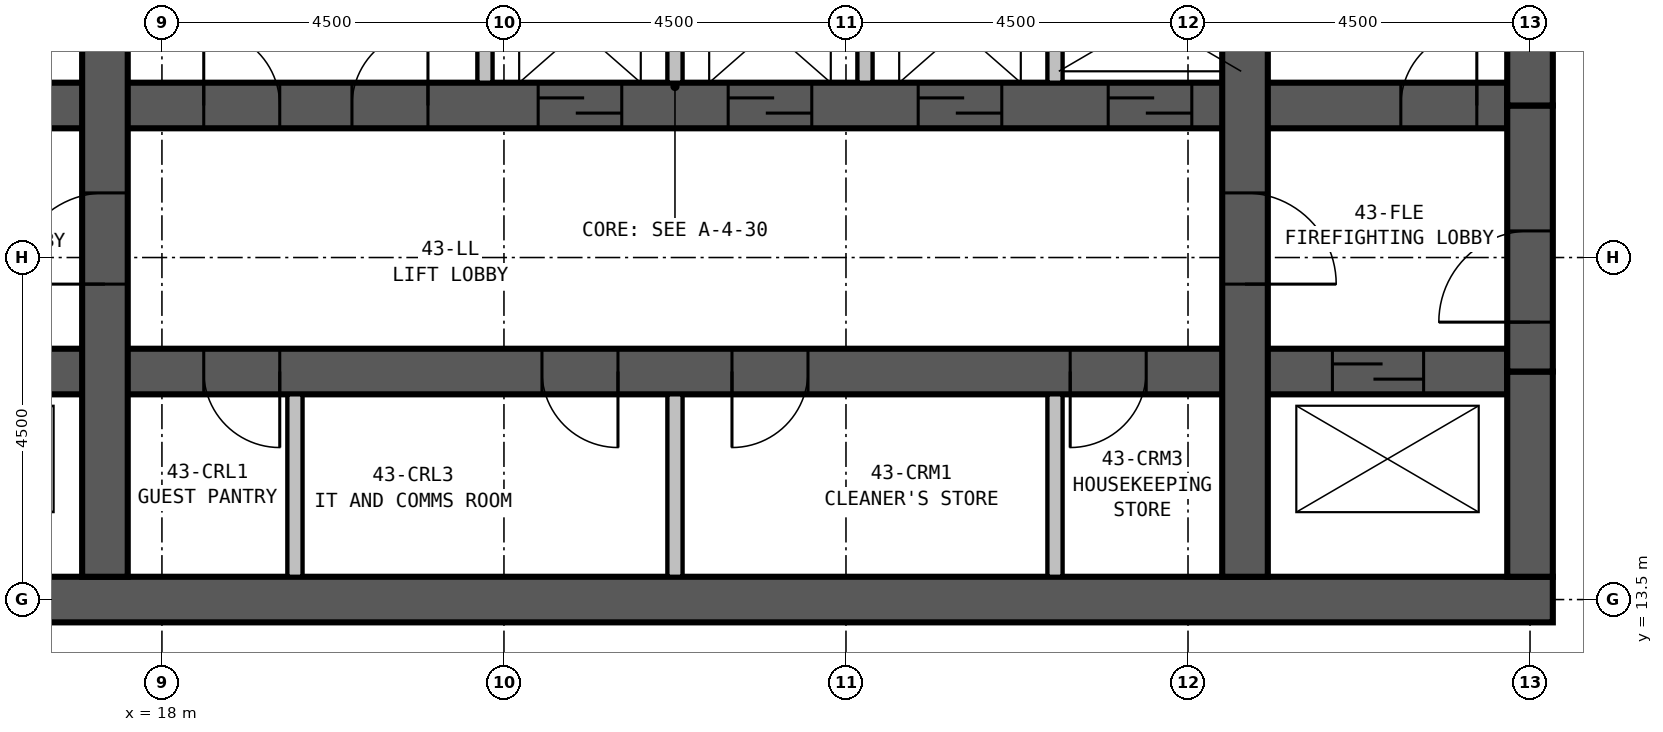
"""IFC4 building model, lengths in metres.
Left out: names, types, materials, properties, quantities, classifications, styles, units other than length and angle.
Written with IfcOpenShell. Run it as: python <this file> out.ifc"""

import sys

from ifc_helpers import new_model, si_unit, direction, frame, frame_2d, origin, place, context, subcontext, project, spatial, rectangle, extrude, element, fill, save


model = new_model("IFC4")
c1 = context("Model", 3, precision=1e-05, world=origin(), true_north=direction((0.0, 1.0)))
c2 = subcontext(c1, "Body", "Model", "MODEL_VIEW")
j1 = project(units=[si_unit("LENGTHUNIT", "METRE"), si_unit("PLANEANGLEUNIT", "RADIAN")], contexts=[c1])
p1 = place(None, origin())
s1 = spatial("IfcSite", under=j1, at=p1, CompositionType="ELEMENT")
p2 = place(p1, origin())
s2 = spatial("IfcBuilding", under=s1, at=p2, CompositionType="ELEMENT")
p3 = place(p2, frame((0.0, 0.0, 169.4)))
s3 = spatial("IfcBuildingStorey", under=s2, at=p3, CompositionType="ELEMENT", Elevation=169.4)
p4 = place(p3, frame((13.2, 13.5, 0.0), z_axis=(0.0, 0.0, 1.0), x_axis=(1.0, 0.0, 0.0)))
e1 = element("IfcWall", 1, at=p4, inside=s3, PredefinedType="SHEAR", context=c2, shape_type="SweptSolid", body=[
    extrude(rectangle(XDim=23.1, YDim=0.6, at=frame_2d((11.55, 0.0))), origin(), (0.0, 0.0, 1.0), 3.5),
])
p5 = place(p3, frame((17.25, 13.8, 0.0), z_axis=(0.0, 0.0, 1.0), x_axis=(0.0, 1.0, 0.0)))
e2 = element("IfcWall", 2, at=p5, inside=s3, PredefinedType="SHEAR", context=c2, shape_type="SweptSolid", body=[
    extrude(rectangle(XDim=12.9, YDim=0.6, at=frame_2d((6.45, 0.0))), origin(), (0.0, 0.0, 1.0), 3.5),
])
p6 = place(p5, frame((3.85, 0.0, 0.0)))
e3 = element("IfcOpeningElement", 3, at=p6, cuts=e2, PredefinedType="OPENING", context=c2, shape_type="SweptSolid", body=[
    extrude(rectangle(XDim=1.2, YDim=2.1, at=frame_2d((0.6, 1.05))), frame((0.0, 0.31, 0.0), z_axis=(0.0, -1.0, 0.0), x_axis=(1.0, 0.0, 0.0)), (0.0, 0.0, 1.0), 0.62),
])
p7 = place(p3, frame((32.25, 13.8, 0.0), z_axis=(0.0, 0.0, 1.0), x_axis=(0.0, 1.0, 0.0)))
e4 = element("IfcWall", 4, at=p7, inside=s3, PredefinedType="SHEAR", context=c2, shape_type="SweptSolid", body=[
    extrude(rectangle(XDim=12.9, YDim=0.6, at=frame_2d((6.45, 0.0))), origin(), (0.0, 0.0, 1.0), 3.5),
])
p8 = place(p7, frame((5.05, 0.0, 0.0), z_axis=(0.0, 0.0, 1.0), x_axis=(-1.0, 0.0, 0.0)))
e5 = element("IfcOpeningElement", 5, at=p8, cuts=e4, PredefinedType="OPENING", context=c2, shape_type="SweptSolid", body=[
    extrude(rectangle(XDim=1.2, YDim=2.1, at=frame_2d((0.6, 1.05))), frame((0.0, 0.31, 0.0), z_axis=(0.0, -1.0, 0.0), x_axis=(1.0, 0.0, 0.0)), (0.0, 0.0, 1.0), 0.62),
])
p9 = place(p3, frame((13.8, 16.5, 0.0), z_axis=(0.0, 0.0, 1.0), x_axis=(1.0, 0.0, 0.0)))
e6 = element("IfcWall", 6, at=p9, inside=s3, PredefinedType="SHEAR", context=c2, shape_type="SweptSolid", body=[
    extrude(rectangle(XDim=21.9, YDim=0.6, at=frame_2d((10.95, 0.0))), origin(), (0.0, 0.0, 1.0), 3.5),
])
p10 = place(p9, frame((5.75, 0.0, 0.0), z_axis=(0.0, 0.0, 1.0), x_axis=(-1.0, 0.0, 0.0)))
e7 = element("IfcOpeningElement", 7, at=p10, cuts=e6, PredefinedType="OPENING", context=c2, shape_type="SweptSolid", body=[
    extrude(rectangle(XDim=1.0, YDim=2.1, at=frame_2d((0.5, 1.05))), frame((0.0, 0.31, 0.0), z_axis=(0.0, -1.0, 0.0), x_axis=(1.0, 0.0, 0.0)), (0.0, 0.0, 1.0), 0.62),
])
p11 = place(p9, frame((10.2, 0.0, 0.0), z_axis=(0.0, 0.0, 1.0), x_axis=(-1.0, 0.0, 0.0)))
e8 = element("IfcOpeningElement", 8, at=p11, cuts=e6, PredefinedType="OPENING", context=c2, shape_type="SweptSolid", body=[
    extrude(rectangle(XDim=1.0, YDim=2.1, at=frame_2d((0.5, 1.05))), frame((0.0, 0.31, 0.0), z_axis=(0.0, -1.0, 0.0), x_axis=(1.0, 0.0, 0.0)), (0.0, 0.0, 1.0), 0.62),
])
p12 = place(p9, frame((12.7, 0.0, 0.0), z_axis=(0.0, 0.0, 1.0), x_axis=(-1.0, 0.0, 0.0)))
e9 = element("IfcOpeningElement", 9, at=p12, cuts=e6, PredefinedType="OPENING", context=c2, shape_type="SweptSolid", body=[
    extrude(rectangle(XDim=1.0, YDim=2.1, at=frame_2d((0.5, 1.05))), frame((0.0, 0.31, 0.0), z_axis=(0.0, -1.0, 0.0), x_axis=(1.0, 0.0, 0.0)), (0.0, 0.0, 1.0), 0.62),
])
p13 = place(p9, frame((17.15, 0.0, 0.0), z_axis=(0.0, 0.0, 1.0), x_axis=(-1.0, 0.0, 0.0)))
e10 = element("IfcOpeningElement", 10, at=p13, cuts=e6, PredefinedType="OPENING", context=c2, shape_type="SweptSolid", body=[
    extrude(rectangle(XDim=1.0, YDim=2.1, at=frame_2d((0.5, 1.05))), frame((0.0, 0.31, 0.0), z_axis=(0.0, -1.0, 0.0), x_axis=(1.0, 0.0, 0.0)), (0.0, 0.0, 1.0), 0.62),
])
p14 = place(p9, frame((0.6, 0.0, 0.0)))
e11 = element("IfcOpeningElement", 11, at=p14, cuts=e6, PredefinedType="OPENING", context=c2, shape_type="SweptSolid", body=[
    extrude(rectangle(XDim=1.2, YDim=2.1, at=frame_2d((0.6, 1.05))), frame((0.0, 0.31, 0.0), z_axis=(0.0, -1.0, 0.0), x_axis=(1.0, 0.0, 0.0)), (0.0, 0.0, 1.0), 0.62),
])
p15 = place(p9, frame((19.6, 0.0, 0.0)))
e12 = element("IfcOpeningElement", 12, at=p15, cuts=e6, PredefinedType="OPENING", context=c2, shape_type="SweptSolid", body=[
    extrude(rectangle(XDim=1.2, YDim=2.1, at=frame_2d((0.6, 1.05))), frame((0.0, 0.31, 0.0), z_axis=(0.0, -1.0, 0.0), x_axis=(1.0, 0.0, 0.0)), (0.0, 0.0, 1.0), 0.62),
])
p16 = place(p3, frame((13.8, 20.0, 0.0), z_axis=(0.0, 0.0, 1.0), x_axis=(1.0, 0.0, 0.0)))
e13 = element("IfcWall", 13, at=p16, inside=s3, PredefinedType="SHEAR", context=c2, shape_type="SweptSolid", body=[
    extrude(rectangle(XDim=21.9, YDim=0.6, at=frame_2d((10.95, 0.0))), origin(), (0.0, 0.0, 1.0), 3.5),
])
p17 = place(p16, frame((0.5, 0.0, 0.0)))
e14 = element("IfcOpeningElement", 14, at=p17, cuts=e13, PredefinedType="OPENING", context=c2, shape_type="SweptSolid", body=[
    extrude(rectangle(XDim=1.0, YDim=2.1, at=frame_2d((0.5, 1.05))), frame((0.0, 0.31, 0.0), z_axis=(0.0, -1.0, 0.0), x_axis=(1.0, 0.0, 0.0)), (0.0, 0.0, 1.0), 0.62),
])
p18 = place(p16, frame((20.5, 0.0, 0.0)))
e15 = element("IfcOpeningElement", 15, at=p18, cuts=e13, PredefinedType="OPENING", context=c2, shape_type="SweptSolid", body=[
    extrude(rectangle(XDim=1.0, YDim=2.1, at=frame_2d((0.5, 1.05))), frame((0.0, 0.31, 0.0), z_axis=(0.0, -1.0, 0.0), x_axis=(1.0, 0.0, 0.0)), (0.0, 0.0, 1.0), 0.62),
])
p19 = place(p16, frame((9.15, 0.0, 0.0)))
e16 = element("IfcOpeningElement", 16, at=p19, cuts=e13, PredefinedType="OPENING", context=c2, shape_type="SweptSolid", body=[
    extrude(rectangle(XDim=1.1, YDim=2.1, at=frame_2d((0.55, 1.05))), frame((0.0, 0.31, 0.0), z_axis=(0.0, -1.0, 0.0), x_axis=(1.0, 0.0, 0.0)), (0.0, 0.0, 1.0), 0.62),
])
p20 = place(p16, frame((11.65, 0.0, 0.0)))
e17 = element("IfcOpeningElement", 17, at=p20, cuts=e13, PredefinedType="OPENING", context=c2, shape_type="SweptSolid", body=[
    extrude(rectangle(XDim=1.1, YDim=2.1, at=frame_2d((0.55, 1.05))), frame((0.0, 0.31, 0.0), z_axis=(0.0, -1.0, 0.0), x_axis=(1.0, 0.0, 0.0)), (0.0, 0.0, 1.0), 0.62),
])
p21 = place(p16, frame((14.15, 0.0, 0.0)))
e18 = element("IfcOpeningElement", 18, at=p21, cuts=e13, PredefinedType="OPENING", context=c2, shape_type="SweptSolid", body=[
    extrude(rectangle(XDim=1.1, YDim=2.1, at=frame_2d((0.55, 1.05))), frame((0.0, 0.31, 0.0), z_axis=(0.0, -1.0, 0.0), x_axis=(1.0, 0.0, 0.0)), (0.0, 0.0, 1.0), 0.62),
])
p22 = place(p16, frame((16.65, 0.0, 0.0)))
e19 = element("IfcOpeningElement", 19, at=p22, cuts=e13, PredefinedType="OPENING", context=c2, shape_type="SweptSolid", body=[
    extrude(rectangle(XDim=1.1, YDim=2.1, at=frame_2d((0.55, 1.05))), frame((0.0, 0.31, 0.0), z_axis=(0.0, -1.0, 0.0), x_axis=(1.0, 0.0, 0.0)), (0.0, 0.0, 1.0), 0.62),
])
p23 = place(p16, frame((4.75, 0.0, 0.0)))
e20 = element("IfcOpeningElement", 20, at=p23, cuts=e13, PredefinedType="OPENING", context=c2, shape_type="SweptSolid", body=[
    extrude(rectangle(XDim=1.0, YDim=2.1, at=frame_2d((0.5, 1.05))), frame((0.0, 0.31, 0.0), z_axis=(0.0, -1.0, 0.0), x_axis=(1.0, 0.0, 0.0)), (0.0, 0.0, 1.0), 0.62),
])
p24 = place(p16, frame((6.7, 0.0, 0.0)))
e21 = element("IfcOpeningElement", 21, at=p24, cuts=e13, PredefinedType="OPENING", context=c2, shape_type="SweptSolid", body=[
    extrude(rectangle(XDim=1.0, YDim=2.1, at=frame_2d((0.5, 1.05))), frame((0.0, 0.31, 0.0), z_axis=(0.0, -1.0, 0.0), x_axis=(1.0, 0.0, 0.0)), (0.0, 0.0, 1.0), 0.62),
])
p25 = place(p3, frame((36.0, 13.8, 0.0), z_axis=(0.0, 0.0, 1.0), x_axis=(0.0, 1.0, 0.0)))
e22 = element("IfcWall", 22, at=p25, inside=s3, PredefinedType="SHEAR", context=c2, shape_type="SweptSolid", body=[
    extrude(rectangle(XDim=2.7, YDim=0.6, at=frame_2d((1.35, 0.0))), origin(), (0.0, 0.0, 1.0), 3.5),
])
p26 = place(p3, frame((36.0, 16.5, 0.0), z_axis=(0.0, 0.0, 1.0), x_axis=(0.0, 1.0, 0.0)))
e23 = element("IfcWall", 23, at=p26, inside=s3, PredefinedType="SHEAR", context=c2, shape_type="SweptSolid", body=[
    extrude(rectangle(XDim=3.5, YDim=0.6, at=frame_2d((1.75, 0.0))), origin(), (0.0, 0.0, 1.0), 3.5),
])
p27 = place(p26, frame((0.65, 0.0, 0.0)))
e24 = element("IfcOpeningElement", 24, at=p27, cuts=e23, PredefinedType="OPENING", context=c2, shape_type="SweptSolid", body=[
    extrude(rectangle(XDim=1.2, YDim=2.1, at=frame_2d((0.6, 1.05))), frame((0.0, 0.31, 0.0), z_axis=(0.0, -1.0, 0.0), x_axis=(1.0, 0.0, 0.0)), (0.0, 0.0, 1.0), 0.62),
])
p28 = place(p3, frame((36.0, 20.0, 0.0), z_axis=(0.0, 0.0, 1.0), x_axis=(0.0, 1.0, 0.0)))
e25 = element("IfcWall", 25, at=p28, inside=s3, PredefinedType="SHEAR", context=c2, shape_type="SweptSolid", body=[
    extrude(rectangle(XDim=6.7, YDim=0.6, at=frame_2d((3.35, 0.0))), origin(), (0.0, 0.0, 1.0), 3.5),
])
p29 = place(p3, frame((19.75, 13.8, 0.0), z_axis=(0.0, 0.0, 1.0), x_axis=(0.0, 1.0, 0.0)))
e26 = element("IfcWall", 26, at=p29, inside=s3, PredefinedType="PARTITIONING", context=c2, shape_type="SweptSolid", body=[
    extrude(rectangle(XDim=2.4, YDim=0.2, at=frame_2d((1.2, 0.0))), origin(), (0.0, 0.0, 1.0), 3.25),
])
p30 = place(p3, frame((22.25, 20.3, 0.0), z_axis=(0.0, 0.0, 1.0), x_axis=(0.0, 1.0, 0.0)))
e27 = element("IfcWall", 27, at=p30, inside=s3, PredefinedType="PARTITIONING", context=c2, shape_type="SweptSolid", body=[
    extrude(rectangle(XDim=3.1, YDim=0.2, at=frame_2d((1.55, 0.0))), origin(), (0.0, 0.0, 1.0), 3.25),
])
p31 = place(p3, frame((24.75, 13.8, 0.0), z_axis=(0.0, 0.0, 1.0), x_axis=(0.0, 1.0, 0.0)))
e28 = element("IfcWall", 28, at=p31, inside=s3, PredefinedType="PARTITIONING", context=c2, shape_type="SweptSolid", body=[
    extrude(rectangle(XDim=2.4, YDim=0.2, at=frame_2d((1.2, 0.0))), origin(), (0.0, 0.0, 1.0), 3.25),
])
for number, where, z_axis, x_axis in (
    (29, (24.75, 20.3, 0.0), (0.0, 0.0, 1.0), (0.0, 1.0, 0.0)),
    (30, (27.25, 20.3, 0.0), (0.0, 0.0, 1.0), (0.0, 1.0, 0.0)),
):
    element("IfcWall", number, at=place(p3, frame(where, z_axis=z_axis, x_axis=x_axis)), inside=s3, PredefinedType="PARTITIONING", context=c2, shape_type="SweptSolid", body=[
        extrude(rectangle(XDim=3.1, YDim=0.2, at=frame_2d((1.55, 0.0))), origin(), (0.0, 0.0, 1.0), 3.25),
    ])
p32 = place(p3, frame((29.75, 13.8, 0.0), z_axis=(0.0, 0.0, 1.0), x_axis=(0.0, 1.0, 0.0)))
e31 = element("IfcWall", 31, at=p32, inside=s3, PredefinedType="PARTITIONING", context=c2, shape_type="SweptSolid", body=[
    extrude(rectangle(XDim=2.4, YDim=0.2, at=frame_2d((1.2, 0.0))), origin(), (0.0, 0.0, 1.0), 3.25),
])
p33 = place(p3, frame((29.75, 20.3, 0.0), z_axis=(0.0, 0.0, 1.0), x_axis=(0.0, 1.0, 0.0)))
e32 = element("IfcWall", 32, at=p33, inside=s3, PredefinedType="PARTITIONING", context=c2, shape_type="SweptSolid", body=[
    extrude(rectangle(XDim=3.1, YDim=0.2, at=frame_2d((1.55, 0.0))), origin(), (0.0, 0.0, 1.0), 3.25),
])
p34 = place(p27, origin())
e33 = element("IfcDoor", 33, at=p34, inside=s3, OperationType="SINGLE_SWING_LEFT", PredefinedType="DOOR", context=c2, shape_type="SweptSolid", body=[
    extrude(rectangle(XDim=1.2, YDim=2.1, at=frame_2d((0.6, 1.05))), frame((0.0, 0.3, 0.0), z_axis=(0.0, -1.0, 0.0), x_axis=(1.0, 0.0, 0.0)), (0.0, 0.0, 1.0), 0.6),
])
fill(e24, e33)
p35 = place(p6, origin())
e34 = element("IfcDoor", 34, at=p35, inside=s3, OperationType="SINGLE_SWING_LEFT", PredefinedType="DOOR", context=c2, shape_type="SweptSolid", body=[
    extrude(rectangle(XDim=1.2, YDim=2.1, at=frame_2d((0.6, 1.05))), frame((0.0, 0.3, 0.0), z_axis=(0.0, -1.0, 0.0), x_axis=(1.0, 0.0, 0.0)), (0.0, 0.0, 1.0), 0.6),
])
fill(e3, e34)
p36 = place(p8, origin())
e35 = element("IfcDoor", 35, at=p36, inside=s3, OperationType="SINGLE_SWING_RIGHT", PredefinedType="DOOR", context=c2, shape_type="SweptSolid", body=[
    extrude(rectangle(XDim=1.2, YDim=2.1, at=frame_2d((0.6, 1.05))), frame((0.0, 0.3, 0.0), z_axis=(0.0, -1.0, 0.0), x_axis=(1.0, 0.0, 0.0)), (0.0, 0.0, 1.0), 0.6),
])
fill(e5, e35)
p37 = place(p18, origin())
e36 = element("IfcDoor", 36, at=p37, inside=s3, OperationType="SINGLE_SWING_RIGHT", PredefinedType="DOOR", context=c2, shape_type="SweptSolid", body=[
    extrude(rectangle(XDim=1.0, YDim=2.1, at=frame_2d((0.5, 1.05))), frame((0.0, 0.3, 0.0), z_axis=(0.0, -1.0, 0.0), x_axis=(1.0, 0.0, 0.0)), (0.0, 0.0, 1.0), 0.6),
])
fill(e15, e36)
p38 = place(p19, origin())
e37 = element("IfcDoor", 37, at=p38, inside=s3, OperationType="SLIDING_TO_LEFT", PredefinedType="DOOR", context=c2, shape_type="SweptSolid", body=[
    extrude(rectangle(XDim=1.1, YDim=2.1, at=frame_2d((0.55, 1.05))), frame((0.0, 0.3, 0.0), z_axis=(0.0, -1.0, 0.0), x_axis=(1.0, 0.0, 0.0)), (0.0, 0.0, 1.0), 0.6),
])
fill(e16, e37)
p39 = place(p20, origin())
e38 = element("IfcDoor", 38, at=p39, inside=s3, OperationType="SLIDING_TO_LEFT", PredefinedType="DOOR", context=c2, shape_type="SweptSolid", body=[
    extrude(rectangle(XDim=1.1, YDim=2.1, at=frame_2d((0.55, 1.05))), frame((0.0, 0.3, 0.0), z_axis=(0.0, -1.0, 0.0), x_axis=(1.0, 0.0, 0.0)), (0.0, 0.0, 1.0), 0.6),
])
fill(e17, e38)
p40 = place(p21, origin())
e39 = element("IfcDoor", 39, at=p40, inside=s3, OperationType="SLIDING_TO_LEFT", PredefinedType="DOOR", context=c2, shape_type="SweptSolid", body=[
    extrude(rectangle(XDim=1.1, YDim=2.1, at=frame_2d((0.55, 1.05))), frame((0.0, 0.3, 0.0), z_axis=(0.0, -1.0, 0.0), x_axis=(1.0, 0.0, 0.0)), (0.0, 0.0, 1.0), 0.6),
])
fill(e18, e39)
p41 = place(p22, origin())
e40 = element("IfcDoor", 40, at=p41, inside=s3, OperationType="SLIDING_TO_LEFT", PredefinedType="DOOR", context=c2, shape_type="SweptSolid", body=[
    extrude(rectangle(XDim=1.1, YDim=2.1, at=frame_2d((0.55, 1.05))), frame((0.0, 0.3, 0.0), z_axis=(0.0, -1.0, 0.0), x_axis=(1.0, 0.0, 0.0)), (0.0, 0.0, 1.0), 0.6),
])
fill(e19, e40)
p42 = place(p10, origin())
e41 = element("IfcDoor", 41, at=p42, inside=s3, OperationType="SINGLE_SWING_LEFT", PredefinedType="DOOR", context=c2, shape_type="SweptSolid", body=[
    extrude(rectangle(XDim=1.0, YDim=2.1, at=frame_2d((0.5, 1.05))), frame((0.0, 0.3, 0.0), z_axis=(0.0, -1.0, 0.0), x_axis=(1.0, 0.0, 0.0)), (0.0, 0.0, 1.0), 0.6),
])
fill(e7, e41)
p43 = place(p11, origin())
e42 = element("IfcDoor", 42, at=p43, inside=s3, OperationType="SINGLE_SWING_LEFT", PredefinedType="DOOR", context=c2, shape_type="SweptSolid", body=[
    extrude(rectangle(XDim=1.0, YDim=2.1, at=frame_2d((0.5, 1.05))), frame((0.0, 0.3, 0.0), z_axis=(0.0, -1.0, 0.0), x_axis=(1.0, 0.0, 0.0)), (0.0, 0.0, 1.0), 0.6),
])
fill(e8, e42)
p44 = place(p12, origin())
e43 = element("IfcDoor", 43, at=p44, inside=s3, OperationType="SINGLE_SWING_RIGHT", PredefinedType="DOOR", context=c2, shape_type="SweptSolid", body=[
    extrude(rectangle(XDim=1.0, YDim=2.1, at=frame_2d((0.5, 1.05))), frame((0.0, 0.3, 0.0), z_axis=(0.0, -1.0, 0.0), x_axis=(1.0, 0.0, 0.0)), (0.0, 0.0, 1.0), 0.6),
])
fill(e9, e43)
p45 = place(p13, origin())
e44 = element("IfcDoor", 44, at=p45, inside=s3, OperationType="SINGLE_SWING_RIGHT", PredefinedType="DOOR", context=c2, shape_type="SweptSolid", body=[
    extrude(rectangle(XDim=1.0, YDim=2.1, at=frame_2d((0.5, 1.05))), frame((0.0, 0.3, 0.0), z_axis=(0.0, -1.0, 0.0), x_axis=(1.0, 0.0, 0.0)), (0.0, 0.0, 1.0), 0.6),
])
fill(e10, e44)
p46 = place(p23, origin())
e45 = element("IfcDoor", 45, at=p46, inside=s3, OperationType="SINGLE_SWING_LEFT", PredefinedType="DOOR", context=c2, shape_type="SweptSolid", body=[
    extrude(rectangle(XDim=1.0, YDim=2.1, at=frame_2d((0.5, 1.05))), frame((0.0, 0.3, 0.0), z_axis=(0.0, -1.0, 0.0), x_axis=(1.0, 0.0, 0.0)), (0.0, 0.0, 1.0), 0.6),
])
fill(e20, e45)
p47 = place(p24, origin())
e46 = element("IfcDoor", 46, at=p47, inside=s3, OperationType="SINGLE_SWING_RIGHT", PredefinedType="DOOR", context=c2, shape_type="SweptSolid", body=[
    extrude(rectangle(XDim=1.0, YDim=2.1, at=frame_2d((0.5, 1.05))), frame((0.0, 0.3, 0.0), z_axis=(0.0, -1.0, 0.0), x_axis=(1.0, 0.0, 0.0)), (0.0, 0.0, 1.0), 0.6),
])
fill(e21, e46)
p48 = place(p15, origin())
e47 = element("IfcDoor", 47, at=p48, inside=s3, OperationType="SLIDING_TO_LEFT", PredefinedType="DOOR", context=c2, shape_type="SweptSolid", body=[
    extrude(rectangle(XDim=1.2, YDim=2.1, at=frame_2d((0.6, 1.05))), frame((0.0, 0.3, 0.0), z_axis=(0.0, -1.0, 0.0), x_axis=(1.0, 0.0, 0.0)), (0.0, 0.0, 1.0), 0.6),
])
fill(e12, e47)
save(model, sys.argv[1])
